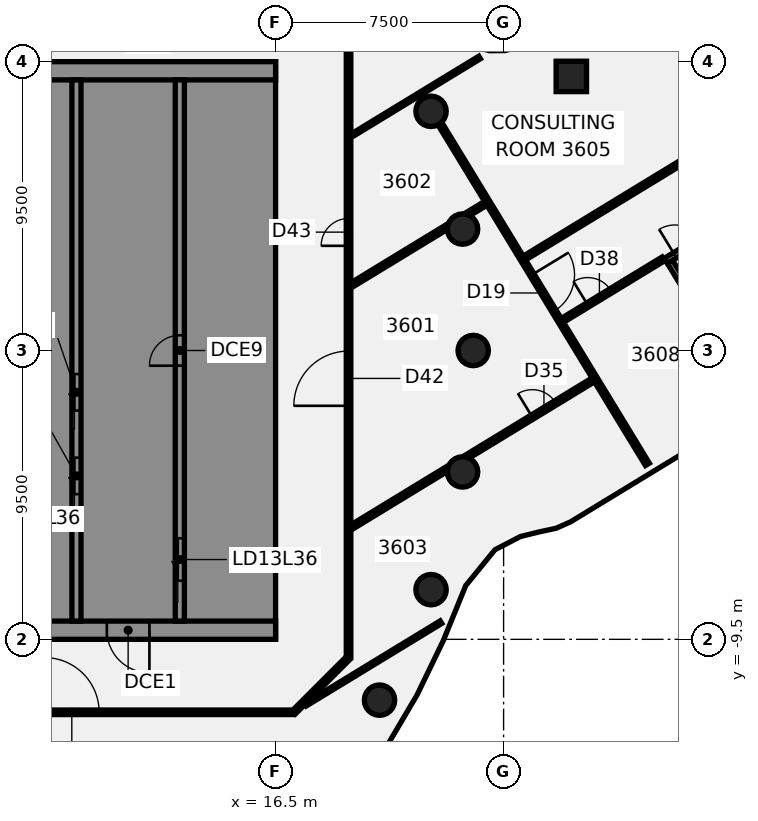
"""IFC4 building model, lengths in metres.
Left out: names, types, materials, properties, quantities, classifications, styles, units other than length and angle.
Written with IfcOpenShell. Run it as: python <this file> out.ifc"""

import sys

from ifc_helpers import new_model, si_unit, direction, frame, frame_2d, origin, origin_2d, place, context, subcontext, project, spatial, polyline, rectangle, circle, outline, extrude, element, fill, save


model = new_model("IFC4")
c1 = context("Model", 3, precision=1e-05, world=origin(), true_north=direction((0.0, 1.0)))
c2 = subcontext(c1, "Body", "Model", "MODEL_VIEW")
j1 = project(units=[si_unit("LENGTHUNIT", "METRE"), si_unit("PLANEANGLEUNIT", "RADIAN")], contexts=[c1])
p1 = place(None, origin())
s1 = spatial("IfcSite", under=j1, at=p1, CompositionType="ELEMENT")
p2 = place(p1, origin())
s2 = spatial("IfcBuilding", under=s1, at=p2, CompositionType="ELEMENT")
p3 = place(p2, frame((0.0, 0.0, 148.0)))
s3 = spatial("IfcBuildingStorey", under=s2, at=p3, CompositionType="ELEMENT", Elevation=148.0)
for number, where, z_axis, x_axis in (
    (1, (23.0, 0.0, -0.14), (0.0, 0.0, 1.0), (1.0, 0.0, 0.0)),
    (2, (22.651, 3.994, -0.14), (0.0, 0.0, 1.0), (1.0, 0.0, 0.0)),
    (3, (21.613, 7.866, -0.14), (0.0, 0.0, 1.0), (1.0, 0.0, 0.0)),
    (4, (19.919, -11.5, -0.14), (0.0, 0.0, 1.0), (1.0, 0.0, 0.0)),
    (5, (21.613, -7.866, -0.14), (0.0, 0.0, 1.0), (1.0, 0.0, 0.0)),
    (6, (22.651, -3.994, -0.14), (0.0, 0.0, 1.0), (1.0, 0.0, 0.0)),
):
    element("IfcColumn", number, at=place(p3, frame(where, z_axis=z_axis, x_axis=x_axis)), inside=s3, PredefinedType="COLUMN", context=c2, shape_type="SweptSolid", body=[
        extrude(circle(Radius=0.5, at=origin_2d()), origin(), (0.0, 0.0, 1.0), 3.75),
    ])
p4 = place(p3, frame((26.228, 9.015, -0.139), z_axis=(-0.043990409117, 0.020108042037, 0.998829570323), x_axis=(0.519858930305, -0.853311640668, 0.040074137328)))
e7 = element("IfcColumn", 7, at=p4, inside=s3, PredefinedType="COLUMN", context=c2, shape_type="SweptSolid", body=[
    extrude(rectangle(XDim=1.0, YDim=1.0, at=origin_2d()), origin(), (0.0, 0.0, 1.0), 3.752),
])
p5 = place(p3, frame((2.807, -11.998, 0.0), z_axis=(0.0, 0.0, 1.0), x_axis=(0.520227143578, -0.854027938117, 0.0)))
e8 = element("IfcWall", 8, at=p5, inside=s3, PredefinedType="PARTITIONING", context=c2, shape_type="SweptSolid", body=[
    extrude(rectangle(XDim=13.129, YDim=0.15, at=frame_2d((6.564, 0.0))), origin(), (0.0, 0.0, 1.0), 3.01),
])
p6 = place(p3, frame((21.905, 7.462, 0.0), z_axis=(0.0, 0.0, 1.0), x_axis=(0.520124017565, -0.854090748312, 0.0)))
e9 = element("IfcWall", 9, at=p6, inside=s3, PredefinedType="PARTITIONING", context=c2, shape_type="SweptSolid", body=[
    extrude(rectangle(XDim=13.121, YDim=0.15, at=frame_2d((6.561, 0.0))), origin(), (0.0, 0.0, 1.0), 3.01),
])
p7 = place(p6, frame((5.822, 0.0, 0.0)))
e10 = element("IfcOpeningElement", 10, at=p7, cuts=e9, PredefinedType="OPENING", context=c2, shape_type="SweptSolid", body=[
    extrude(rectangle(XDim=1.4, YDim=2.1, at=frame_2d((0.7, 1.05))), frame((0.0, 0.085, 0.0), z_axis=(0.0, -1.0, 0.0), x_axis=(1.0, 0.0, 0.0)), (0.0, 0.0, 1.0), 0.17),
])
p8 = place(p3, frame((-17.1, -11.9, 0.0), z_axis=(0.0, 0.0, 1.0), x_axis=(1.0, 0.0, 0.0)))
e11 = element("IfcWall", 11, at=p8, inside=s3, PredefinedType="PARTITIONING", context=c2, shape_type="SweptSolid", body=[
    extrude(rectangle(XDim=34.165, YDim=0.15, at=frame_2d((17.083, 0.0))), origin(), (0.0, 0.0, 1.0), 3.01),
])
p9 = place(p8, frame((10.117, 0.0, 0.0)))
e12 = element("IfcOpeningElement", 12, at=p9, cuts=e11, PredefinedType="OPENING", context=c2, shape_type="SweptSolid", body=[
    extrude(rectangle(XDim=1.8, YDim=2.1, at=frame_2d((0.9, 1.05))), frame((0.0, 0.085, 0.0), z_axis=(0.0, -1.0, 0.0), x_axis=(1.0, 0.0, 0.0)), (0.0, 0.0, 1.0), 0.17),
])
p10 = place(p8, frame((1.8, 0.0, 0.0)))
e13 = element("IfcOpeningElement", 13, at=p10, cuts=e11, PredefinedType="OPENING", context=c2, shape_type="SweptSolid", body=[
    extrude(rectangle(XDim=1.8, YDim=2.1, at=frame_2d((0.9, 1.05))), frame((0.0, 0.085, 0.0), z_axis=(0.0, -1.0, 0.0), x_axis=(1.0, 0.0, 0.0)), (0.0, 0.0, 1.0), 0.17),
])
p11 = place(p8, frame((25.997, 0.0, 0.0)))
e14 = element("IfcOpeningElement", 14, at=p11, cuts=e11, PredefinedType="OPENING", context=c2, shape_type="SweptSolid", body=[
    extrude(rectangle(XDim=1.8, YDim=2.1, at=frame_2d((0.9, 1.05))), frame((0.0, 0.085, 0.0), z_axis=(0.0, -1.0, 0.0), x_axis=(1.0, 0.0, 0.0)), (0.0, 0.0, 1.0), 0.17),
])
p12 = place(p3, frame((17.485, -11.649, 0.0), z_axis=(0.0, 0.0, 1.0), x_axis=(0.854029500241, 0.520224579118, 0.0)))
e15 = element("IfcWall", 15, at=p12, inside=s3, PredefinedType="PARTITIONING", context=c2, shape_type="SweptSolid", body=[
    extrude(rectangle(XDim=5.216, YDim=0.1, at=frame_2d((2.608, 0.0))), origin(), (0.0, 0.0, 1.0), 3.01),
])
p13 = place(p3, frame((18.998, -5.809, 0.0), z_axis=(0.0, 0.0, 1.0), x_axis=(0.854053899757, 0.520184521406, 0.0)))
e16 = element("IfcWall", 16, at=p13, inside=s3, PredefinedType="PARTITIONING", context=c2, shape_type="SweptSolid", body=[
    extrude(rectangle(XDim=3.716, YDim=0.15, at=frame_2d((1.858, 0.0))), origin(), (0.0, 0.0, 1.0), 3.01),
])
p14 = place(p3, frame((22.765, -3.515, 0.0), z_axis=(0.0, 0.0, 1.0), x_axis=(0.854058866749, 0.520176366368, 0.0)))
e17 = element("IfcWall", 17, at=p14, inside=s3, PredefinedType="PARTITIONING", context=c2, shape_type="SweptSolid", body=[
    extrude(rectangle(XDim=4.895, YDim=0.15, at=frame_2d((2.447, 0.0))), origin(), (0.0, 0.0, 1.0), 3.01),
])
p15 = place(p14, frame((2.55, 0.0, 0.0)))
e18 = element("IfcOpeningElement", 18, at=p15, cuts=e17, PredefinedType="OPENING", context=c2, shape_type="SweptSolid", body=[
    extrude(rectangle(XDim=0.9, YDim=2.1, at=frame_2d((0.45, 1.05))), frame((0.0, 0.085, 0.0), z_axis=(0.0, -1.0, 0.0), x_axis=(1.0, 0.0, 0.0)), (0.0, 0.0, 1.0), 0.17),
])
p16 = place(p3, frame((18.998, 2.153, 0.0), z_axis=(0.0, 0.0, 1.0), x_axis=(0.854120951194, 0.520074418454, 0.0)))
e19 = element("IfcWall", 19, at=p16, inside=s3, PredefinedType="PARTITIONING", context=c2, shape_type="SweptSolid", body=[
    extrude(rectangle(XDim=3.706, YDim=0.15, at=frame_2d((1.853, 0.0))), origin(), (0.0, 0.0, 1.0), 3.01),
])
p17 = place(p3, frame((22.796, 4.465, 0.0), z_axis=(0.0, 0.0, 1.0), x_axis=(0.854113155066, 0.520087221862, 0.0)))
e20 = element("IfcWall", 20, at=p17, inside=s3, PredefinedType="PARTITIONING", context=c2, shape_type="SweptSolid", body=[
    extrude(rectangle(XDim=0.718, YDim=0.15, at=frame_2d((0.359, 0.0))), origin(), (0.0, 0.0, 1.0), 3.01),
])
p18 = place(p3, frame((18.981, 7.06, 0.0), z_axis=(0.0, 0.0, 1.0), x_axis=(0.854024301645, 0.520233113326, 0.0)))
e21 = element("IfcWall", 21, at=p18, inside=s3, PredefinedType="PARTITIONING", context=c2, shape_type="SweptSolid", body=[
    extrude(rectangle(XDim=4.952, YDim=0.1, at=frame_2d((2.476, 0.0))), origin(), (0.0, 0.0, 1.0), 3.01),
])
p19 = place(p3, frame((24.689, 3.044, 0.0), z_axis=(0.0, 0.0, 1.0), x_axis=(0.854065339792, 0.520165738363, 0.0)))
e22 = element("IfcWall", 22, at=p19, inside=s3, PredefinedType="PARTITIONING", context=c2, shape_type="SweptSolid", body=[
    extrude(rectangle(XDim=17.84, YDim=0.15, at=frame_2d((8.92, 0.0))), origin(), (0.0, 0.0, 1.0), 3.01),
])
p20 = place(p19, frame((8.17, 0.0, 0.0)))
e23 = element("IfcOpeningElement", 23, at=p20, cuts=e22, PredefinedType="OPENING", context=c2, shape_type="SweptSolid", body=[
    extrude(rectangle(XDim=0.9, YDim=2.1, at=frame_2d((0.45, 1.05))), frame((0.0, 0.085, 0.0), z_axis=(0.0, -1.0, 0.0), x_axis=(1.0, 0.0, 0.0)), (0.0, 0.0, 1.0), 0.17),
])
p21 = place(p19, frame((14.62, 0.0, 0.0)))
e24 = element("IfcOpeningElement", 24, at=p21, cuts=e22, PredefinedType="OPENING", context=c2, shape_type="SweptSolid", body=[
    extrude(rectangle(XDim=0.9, YDim=2.1, at=frame_2d((0.45, 1.05))), frame((0.0, 0.085, 0.0), z_axis=(0.0, -1.0, 0.0), x_axis=(1.0, 0.0, 0.0)), (0.0, 0.0, 1.0), 0.17),
])
p22 = place(p3, frame((25.938, 0.994, 0.0), z_axis=(0.0, 0.0, 1.0), x_axis=(0.854092814708, 0.520120624341, 0.0)))
e25 = element("IfcWall", 25, at=p22, inside=s3, PredefinedType="PARTITIONING", context=c2, shape_type="SweptSolid", body=[
    extrude(rectangle(XDim=3.88, YDim=0.15, at=frame_2d((1.94, 0.0))), origin(), (0.0, 0.0, 1.0), 3.01),
])
p23 = place(p22, frame((0.97, 0.0, 0.0)))
e26 = element("IfcOpeningElement", 26, at=p23, cuts=e25, PredefinedType="OPENING", context=c2, shape_type="SweptSolid", body=[
    extrude(rectangle(XDim=0.9, YDim=2.1, at=frame_2d((0.45, 1.05))), frame((0.0, 0.085, 0.0), z_axis=(0.0, -1.0, 0.0), x_axis=(1.0, 0.0, 0.0)), (0.0, 0.0, 1.0), 0.17),
])
p24 = place(p3, frame((17.1, -11.9, 0.0), z_axis=(0.0, 0.0, 1.0), x_axis=(0.707106781187, 0.707106781187, 0.0)))
e27 = element("IfcWall", 27, at=p24, inside=s3, PredefinedType="PARTITIONING", context=c2, shape_type="SweptSolid", body=[
    extrude(rectangle(XDim=2.505, YDim=0.15, at=frame_2d((1.253, 0.0))), origin(), (0.0, 0.0, 1.0), 3.01),
])
p25 = place(p3, frame((18.9, -10.1, 0.0), z_axis=(0.0, 0.0, 1.0), x_axis=(0.0, 1.0, 0.0)))
e28 = element("IfcWall", 28, at=p25, inside=s3, PredefinedType="PARTITIONING", context=c2, shape_type="SweptSolid", body=[
    extrude(rectangle(XDim=20.2, YDim=0.15, at=frame_2d((10.1, 0.0))), origin(), (0.0, 0.0, 1.0), 3.01),
])
p26 = place(p25, frame((8.281, 0.0, 0.0)))
e29 = element("IfcOpeningElement", 29, at=p26, cuts=e28, PredefinedType="OPENING", context=c2, shape_type="SweptSolid", body=[
    extrude(rectangle(XDim=1.8, YDim=2.1, at=frame_2d((0.9, 1.05))), frame((0.0, 0.085, 0.0), z_axis=(0.0, -1.0, 0.0), x_axis=(1.0, 0.0, 0.0)), (0.0, 0.0, 1.0), 0.17),
])
p27 = place(p25, frame((13.543, 0.0, 0.0)))
e30 = element("IfcOpeningElement", 30, at=p27, cuts=e28, PredefinedType="OPENING", context=c2, shape_type="SweptSolid", body=[
    extrude(rectangle(XDim=0.9, YDim=2.1, at=frame_2d((0.45, 1.05))), frame((0.0, 0.085, 0.0), z_axis=(0.0, -1.0, 0.0), x_axis=(1.0, 0.0, 0.0)), (0.0, 0.0, 1.0), 0.17),
])
p28 = place(p3, frame((16.5, -9.2, 0.0), z_axis=(0.0, 0.0, 1.0), x_axis=(-1.0, 0.0, 0.0)))
e31 = element("IfcWall", 31, at=p28, inside=s3, PredefinedType="SHEAR", context=c2, shape_type="SweptSolid", body=[
    extrude(rectangle(XDim=13.0, YDim=0.6, at=frame_2d((6.5, 0.0))), origin(), (0.0, 0.0, 1.0), 3.61),
])
p29 = place(p28, frame((4.15, 0.0, 0.0)))
e32 = element("IfcOpeningElement", 32, at=p29, cuts=e31, PredefinedType="OPENING", context=c2, shape_type="SweptSolid", body=[
    extrude(rectangle(XDim=1.4, YDim=2.1, at=frame_2d((0.7, 1.05))), frame((0.0, 0.31, 0.0), z_axis=(0.0, -1.0, 0.0), x_axis=(1.0, 0.0, 0.0)), (0.0, 0.0, 1.0), 0.62),
])
p30 = place(p28, frame((10.125, 0.0, 0.0)))
e33 = element("IfcOpeningElement", 33, at=p30, cuts=e31, PredefinedType="OPENING", context=c2, shape_type="SweptSolid", body=[
    extrude(rectangle(XDim=1.4, YDim=2.1, at=frame_2d((0.7, 1.05))), frame((0.0, 0.31, 0.0), z_axis=(0.0, -1.0, 0.0), x_axis=(1.0, 0.0, 0.0)), (0.0, 0.0, 1.0), 0.62),
])
p31 = place(p3, origin())
e34 = element("IfcWall", 34, at=p31, inside=s3, PredefinedType="SHEAR", context=c2, shape_type="SweptSolid", body=[
    extrude(outline(polyline([(13.5, -8.125), (13.5, -8.9), (15.9, -8.9), (16.5, -8.9), (16.5, 8.9), (15.9, 8.9), (13.5, 8.9), (13.5, 8.125), (15.9, 8.125), (15.9, 5.625), (13.5, 5.625), (13.5, 5.375), (15.9, 5.375), (15.9, -5.375), (13.5, -5.375), (13.5, -5.625), (15.9, -5.625), (15.9, -8.125), (13.5, -8.125)])), origin(), (0.0, 0.0, 1.0), 3.61),
])
p32 = place(p3, frame((16.5, 9.2, 0.0), z_axis=(0.0, 0.0, 1.0), x_axis=(-1.0, 0.0, 0.0)))
e35 = element("IfcWall", 35, at=p32, inside=s3, PredefinedType="SHEAR", context=c2, shape_type="SweptSolid", body=[
    extrude(rectangle(XDim=13.0, YDim=0.6, at=frame_2d((6.5, 0.0))), origin(), (0.0, 0.0, 1.0), 3.61),
])
p33 = place(p3, origin())
e36 = element("IfcWall", 36, at=p33, inside=s3, PredefinedType="SHEAR", context=c2, shape_type="SweptSolid", body=[
    extrude(outline(polyline([(9.8, -5.375), (7.5, -5.375), (7.5, -2.875), (9.8, -2.875), (9.8, -2.625), (7.5, -2.625), (7.5, -0.125), (9.8, -0.125), (9.8, 0.125), (7.5, 0.125), (7.5, 2.625), (9.8, 2.625), (9.8, 2.875), (7.5, 2.875), (7.5, 5.375), (9.8, 5.375), (9.8, 5.625), (7.5, 5.625), (7.5, 8.125), (9.8, 8.125), (9.8, 8.9), (7.5, 8.9), (7.2, 8.9), (7.2, -5.625), (7.5, -5.625), (9.8, -5.625), (9.8, -5.375)])), origin(), (0.0, 0.0, 1.0), 3.61),
])
p34 = place(p3, origin())
e37 = element("IfcWall", 37, at=p34, inside=s3, PredefinedType="SHEAR", context=c2, shape_type="SweptSolid", body=[
    extrude(outline(polyline([(7.5, -8.125), (7.5, -8.9), (9.8, -8.9), (9.8, -8.125), (9.8, -5.625), (9.55, -5.625), (9.55, -8.125), (7.5, -8.125)])), origin(), (0.0, 0.0, 1.0), 3.61),
])
p35 = place(p3, frame((13.35, -8.9, 0.0), z_axis=(0.0, 0.0, 1.0), x_axis=(0.0, 1.0, 0.0)))
e38 = element("IfcWall", 38, at=p35, inside=s3, PredefinedType="SHEAR", context=c2, shape_type="SweptSolid", body=[
    extrude(rectangle(XDim=17.8, YDim=0.3, at=frame_2d((8.9, 0.0))), origin(), (0.0, 0.0, 1.0), 3.61),
])
p36 = place(p35, frame((1.325, 0.0, 0.0)))
e39 = element("IfcOpeningElement", 39, at=p36, cuts=e38, PredefinedType="OPENING", context=c2, shape_type="SweptSolid", body=[
    extrude(rectangle(XDim=1.4, YDim=2.1, at=frame_2d((0.7, 1.05))), frame((0.0, 0.16, 0.0), z_axis=(0.0, -1.0, 0.0), x_axis=(1.0, 0.0, 0.0)), (0.0, 0.0, 1.0), 0.32),
])
p37 = place(p35, frame((8.4, 0.0, 0.0)))
e40 = element("IfcOpeningElement", 40, at=p37, cuts=e38, PredefinedType="OPENING", context=c2, shape_type="SweptSolid", body=[
    extrude(rectangle(XDim=1.0, YDim=2.1, at=frame_2d((0.5, 1.05))), frame((0.0, 0.16, 0.0), z_axis=(0.0, -1.0, 0.0), x_axis=(1.0, 0.0, 0.0)), (0.0, 0.0, 1.0), 0.32),
])
p38 = place(p3, frame((9.95, -8.9, 0.0), z_axis=(0.0, 0.0, 1.0), x_axis=(0.0, 1.0, 0.0)))
e41 = element("IfcWall", 41, at=p38, inside=s3, PredefinedType="SHEAR", context=c2, shape_type="SweptSolid", body=[
    extrude(rectangle(XDim=17.8, YDim=0.3, at=frame_2d((8.9, 0.0))), origin(), (0.0, 0.0, 1.0), 3.61),
])
p39 = place(p38, frame((4.175, 0.0, 0.0)))
e42 = element("IfcOpeningElement", 42, at=p39, cuts=e41, PredefinedType="OPENING", context=c2, shape_type="SweptSolid", body=[
    extrude(rectangle(XDim=1.2, YDim=2.1, at=frame_2d((0.6, 1.05))), frame((0.0, 0.16, 0.0), z_axis=(0.0, -1.0, 0.0), x_axis=(1.0, 0.0, 0.0)), (0.0, 0.0, 1.0), 0.32),
])
p40 = place(p38, frame((6.925, 0.0, 0.0)))
e43 = element("IfcOpeningElement", 43, at=p40, cuts=e41, PredefinedType="OPENING", context=c2, shape_type="SweptSolid", body=[
    extrude(rectangle(XDim=1.2, YDim=2.1, at=frame_2d((0.6, 1.05))), frame((0.0, 0.16, 0.0), z_axis=(0.0, -1.0, 0.0), x_axis=(1.0, 0.0, 0.0)), (0.0, 0.0, 1.0), 0.32),
])
p41 = place(p3, frame((29.338, 2.947, -0.14), z_axis=(0.0, 0.0, 1.0), x_axis=(0.854046532708, 0.520196616646, 0.0)))
e44 = element("IfcWall", 44, at=p41, inside=s3, PredefinedType="SHEAR", context=c2, shape_type="SweptSolid", body=[
    extrude(rectangle(XDim=6.7, YDim=0.2, at=frame_2d((3.35, 0.0))), origin(), (0.0, 0.0, 1.0), 3.15),
])
p42 = place(p41, frame((0.35, 0.0, 0.0)))
e45 = element("IfcOpeningElement", 45, at=p42, cuts=e44, PredefinedType="OPENING", context=c2, shape_type="SweptSolid", body=[
    extrude(rectangle(XDim=1.0, YDim=2.1, at=frame_2d((0.5, 1.05))), frame((0.0, 0.11, 0.0), z_axis=(0.0, -1.0, 0.0), x_axis=(1.0, 0.0, 0.0)), (0.0, 0.0, 1.0), 0.22),
])
p43 = place(p3, frame((31.14, 0.181, -0.14), z_axis=(0.0, 0.0, 1.0), x_axis=(-0.520150233826, 0.854074782587, 0.0)))
e46 = element("IfcWall", 46, at=p43, inside=s3, PredefinedType="SHEAR", context=c2, shape_type="SweptSolid", body=[
    extrude(rectangle(XDim=3.2, YDim=0.2, at=frame_2d((1.6, 0.0))), origin(), (0.0, 0.0, 1.0), 3.15),
])
p44 = place(p7, frame((1.4, 0.0, 0.0), z_axis=(0.0, 0.0, 1.0), x_axis=(-1.0, 0.0, 0.0)))
e47 = element("IfcDoor", 47, at=p44, inside=s3, OperationType="DOUBLE_DOOR_SINGLE_SWING", PredefinedType="DOOR", context=c2, shape_type="SweptSolid", body=[
    extrude(rectangle(XDim=1.4, YDim=2.1, at=frame_2d((0.7, 1.05))), frame((0.0, 0.025, 0.0), z_axis=(0.0, -1.0, 0.0), x_axis=(1.0, 0.0, 0.0)), (0.0, 0.0, 1.0), 0.05),
])
fill(e10, e47)
p45 = place(p11, frame((1.8, 0.0, 0.0), z_axis=(0.0, 0.0, 1.0), x_axis=(-1.0, 0.0, 0.0)))
e48 = element("IfcDoor", 48, at=p45, inside=s3, OperationType="DOUBLE_DOOR_SINGLE_SWING", PredefinedType="DOOR", context=c2, shape_type="SweptSolid", body=[
    extrude(rectangle(XDim=1.8, YDim=2.1, at=frame_2d((0.9, 1.05))), frame((0.0, 0.025, 0.0), z_axis=(0.0, -1.0, 0.0), x_axis=(1.0, 0.0, 0.0)), (0.0, 0.0, 1.0), 0.05),
])
fill(e14, e48)
p46 = place(p15, frame((0.9, 0.0, 0.0), z_axis=(0.0, 0.0, 1.0), x_axis=(-1.0, 0.0, 0.0)))
e49 = element("IfcDoor", 49, at=p46, inside=s3, OperationType="SINGLE_SWING_RIGHT", PredefinedType="DOOR", context=c2, shape_type="SweptSolid", body=[
    extrude(rectangle(XDim=0.9, YDim=2.1, at=frame_2d((0.45, 1.05))), frame((0.0, 0.025, 0.0), z_axis=(0.0, -1.0, 0.0), x_axis=(1.0, 0.0, 0.0)), (0.0, 0.0, 1.0), 0.05),
])
fill(e18, e49)
p47 = place(p23, frame((0.9, 0.0, 0.0), z_axis=(0.0, 0.0, 1.0), x_axis=(-1.0, 0.0, 0.0)))
e50 = element("IfcDoor", 50, at=p47, inside=s3, OperationType="SINGLE_SWING_LEFT", PredefinedType="DOOR", context=c2, shape_type="SweptSolid", body=[
    extrude(rectangle(XDim=0.9, YDim=2.1, at=frame_2d((0.45, 1.05))), frame((0.0, 0.025, 0.0), z_axis=(0.0, -1.0, 0.0), x_axis=(1.0, 0.0, 0.0)), (0.0, 0.0, 1.0), 0.05),
])
fill(e26, e50)
p48 = place(p26, origin())
e51 = element("IfcDoor", 51, at=p48, inside=s3, OperationType="DOUBLE_DOOR_SINGLE_SWING", PredefinedType="DOOR", context=c2, shape_type="SweptSolid", body=[
    extrude(rectangle(XDim=1.8, YDim=2.1, at=frame_2d((0.9, 1.05))), frame((0.0, 0.025, 0.0), z_axis=(0.0, -1.0, 0.0), x_axis=(1.0, 0.0, 0.0)), (0.0, 0.0, 1.0), 0.05),
])
fill(e29, e51)
p49 = place(p27, frame((0.9, 0.0, 0.0), z_axis=(0.0, 0.0, 1.0), x_axis=(-1.0, 0.0, 0.0)))
e52 = element("IfcDoor", 52, at=p49, inside=s3, OperationType="SINGLE_SWING_RIGHT", PredefinedType="DOOR", context=c2, shape_type="SweptSolid", body=[
    extrude(rectangle(XDim=0.9, YDim=2.1, at=frame_2d((0.45, 1.05))), frame((0.0, 0.025, 0.0), z_axis=(0.0, -1.0, 0.0), x_axis=(1.0, 0.0, 0.0)), (0.0, 0.0, 1.0), 0.05),
])
fill(e30, e52)
p50 = place(p29, origin())
e53 = element("IfcDoor", 53, at=p50, inside=s3, OperationType="SINGLE_SWING_LEFT", PredefinedType="DOOR", context=c2, shape_type="SweptSolid", body=[
    extrude(rectangle(XDim=1.4, YDim=2.1, at=frame_2d((0.7, 1.05))), frame((0.0, 0.025, 0.0), z_axis=(0.0, -1.0, 0.0), x_axis=(1.0, 0.0, 0.0)), (0.0, 0.0, 1.0), 0.05),
])
fill(e32, e53)
p51 = place(p36, origin())
e54 = element("IfcDoor", 54, at=p51, inside=s3, OperationType="SLIDING_TO_LEFT", PredefinedType="DOOR", context=c2, shape_type="SweptSolid", body=[
    extrude(rectangle(XDim=1.4, YDim=2.1, at=frame_2d((0.7, 1.05))), frame((0.0, 0.025, 0.0), z_axis=(0.0, -1.0, 0.0), x_axis=(1.0, 0.0, 0.0)), (0.0, 0.0, 1.0), 0.05),
])
fill(e39, e54)
p52 = place(p39, origin())
e55 = element("IfcDoor", 55, at=p52, inside=s3, OperationType="SLIDING_TO_LEFT", PredefinedType="DOOR", context=c2, shape_type="SweptSolid", body=[
    extrude(rectangle(XDim=1.2, YDim=2.1, at=frame_2d((0.6, 1.05))), frame((0.0, 0.025, 0.0), z_axis=(0.0, -1.0, 0.0), x_axis=(1.0, 0.0, 0.0)), (0.0, 0.0, 1.0), 0.05),
])
fill(e42, e55)
p53 = place(p40, origin())
e56 = element("IfcDoor", 56, at=p53, inside=s3, OperationType="SLIDING_TO_LEFT", PredefinedType="DOOR", context=c2, shape_type="SweptSolid", body=[
    extrude(rectangle(XDim=1.2, YDim=2.1, at=frame_2d((0.6, 1.05))), frame((0.0, 0.025, 0.0), z_axis=(0.0, -1.0, 0.0), x_axis=(1.0, 0.0, 0.0)), (0.0, 0.0, 1.0), 0.05),
])
fill(e43, e56)
p54 = place(p37, origin())
e57 = element("IfcDoor", 57, at=p54, inside=s3, OperationType="SINGLE_SWING_LEFT", PredefinedType="DOOR", context=c2, shape_type="SweptSolid", body=[
    extrude(rectangle(XDim=1.0, YDim=2.1, at=frame_2d((0.5, 1.05))), frame((0.0, 0.025, 0.0), z_axis=(0.0, -1.0, 0.0), x_axis=(1.0, 0.0, 0.0)), (0.0, 0.0, 1.0), 0.05),
])
fill(e40, e57)
p55 = place(p42, origin())
e58 = element("IfcDoor", 58, at=p55, inside=s3, OperationType="SINGLE_SWING_LEFT", PredefinedType="DOOR", context=c2, shape_type="SweptSolid", body=[
    extrude(rectangle(XDim=1.0, YDim=2.1, at=frame_2d((0.5, 1.05))), frame((0.0, 0.025, 0.0), z_axis=(0.0, -1.0, 0.0), x_axis=(1.0, 0.0, 0.0)), (0.0, 0.0, 1.0), 0.05),
])
fill(e45, e58)
save(model, sys.argv[1])
